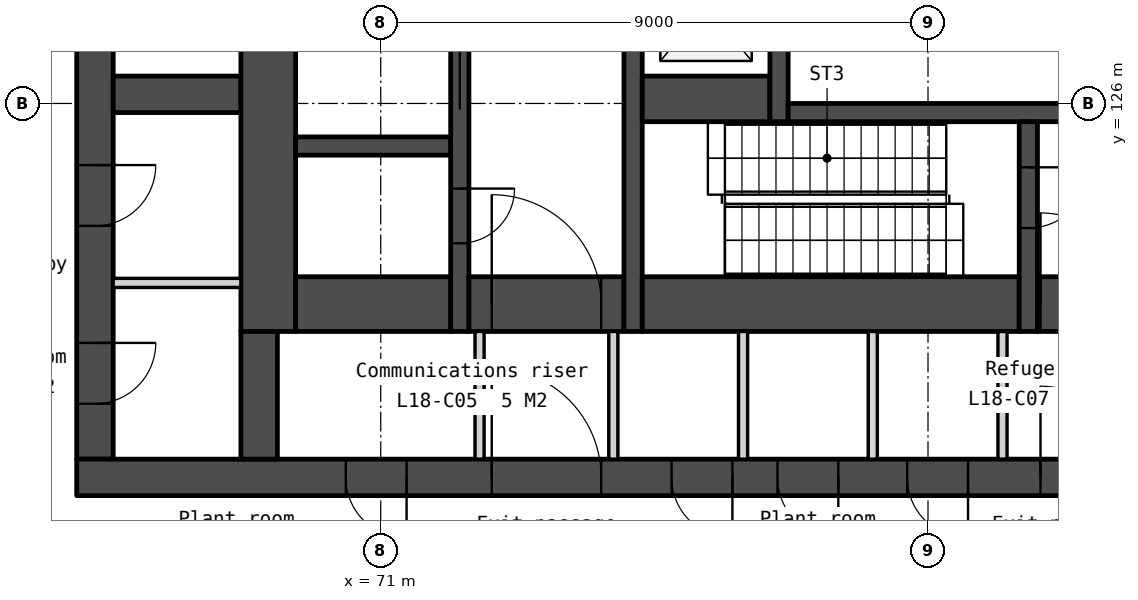
"""IFC4 building model, lengths in metres.
Left out: names, types, materials, properties, quantities, classifications, styles, units other than length and angle.
Written with IfcOpenShell. Run it as: python <this file> out.ifc"""

import sys

from ifc_helpers import new_model, si_unit, direction, frame, frame_2d, origin, place, context, subcontext, project, spatial, rectangle, extrude, element, fill, save


model = new_model("IFC4")
c1 = context("Model", 3, precision=1e-05, world=origin(), true_north=direction((0.0, 1.0)))
c2 = subcontext(c1, "Body", "Model", "MODEL_VIEW")
j1 = project(units=[si_unit("LENGTHUNIT", "METRE"), si_unit("PLANEANGLEUNIT", "RADIAN")], contexts=[c1])
p1 = place(None, origin())
s1 = spatial("IfcSite", under=j1, at=p1, CompositionType="ELEMENT")
p2 = place(p1, origin())
s2 = spatial("IfcBuilding", under=s1, at=p2, CompositionType="ELEMENT")
p3 = place(p2, frame((0.0, 0.0, 77.0)))
s3 = spatial("IfcBuildingStorey", under=s2, at=p3, CompositionType="ELEMENT", Elevation=77.0)
p4 = place(p3, frame((66.3, 133.95, 0.0), z_axis=(0.0, 0.0, 1.0), x_axis=(0.0, -1.0, 0.0)))
e1 = element("IfcWall", 1, at=p4, inside=s3, PredefinedType="SOLIDWALL", context=c2, shape_type="SweptSolid", body=[
    extrude(rectangle(XDim=13.8, YDim=0.6, at=frame_2d((6.9, 0.0))), origin(), (0.0, 0.0, 1.0), 4.35),
])
p5 = place(p4, frame((0.6, 0.0, 0.0)))
e2 = element("IfcOpeningElement", 2, at=p5, cuts=e1, PredefinedType="OPENING", context=c2, shape_type="SweptSolid", body=[
    extrude(rectangle(XDim=1.1, YDim=2.1, at=frame_2d((0.55, 1.05))), frame((0.0, 0.31, 0.0), z_axis=(0.0, -1.0, 0.0), x_axis=(1.0, 0.0, 0.0)), (0.0, 0.0, 1.0), 0.62),
])
p6 = place(p4, frame((11.888, 0.0, 0.0)))
e3 = element("IfcOpeningElement", 3, at=p6, cuts=e1, PredefinedType="OPENING", context=c2, shape_type="SweptSolid", body=[
    extrude(rectangle(XDim=1.0, YDim=2.1, at=frame_2d((0.5, 1.05))), frame((0.0, 0.31, 0.0), z_axis=(0.0, -1.0, 0.0), x_axis=(1.0, 0.0, 0.0)), (0.0, 0.0, 1.0), 0.62),
])
p7 = place(p4, frame((8.963, 0.0, 0.0)))
e4 = element("IfcOpeningElement", 4, at=p7, cuts=e1, PredefinedType="OPENING", context=c2, shape_type="SweptSolid", body=[
    extrude(rectangle(XDim=1.0, YDim=2.1, at=frame_2d((0.5, 1.05))), frame((0.0, 0.31, 0.0), z_axis=(0.0, -1.0, 0.0), x_axis=(1.0, 0.0, 0.0)), (0.0, 0.0, 1.0), 0.62),
])
p8 = place(p3, frame((66.0, 119.85, 0.0), z_axis=(0.0, 0.0, 1.0), x_axis=(1.0, 0.0, 0.0)))
e5 = element("IfcWall", 5, at=p8, inside=s3, PredefinedType="SOLIDWALL", context=c2, shape_type="SweptSolid", body=[
    extrude(rectangle(XDim=28.0, YDim=0.6, at=frame_2d((14.0, 0.0))), origin(), (0.0, 0.0, 1.0), 4.35),
])
p9 = place(p8, frame((6.825, 0.0, 0.0)))
e6 = element("IfcOpeningElement", 6, at=p9, cuts=e5, PredefinedType="OPENING", context=c2, shape_type="SweptSolid", body=[
    extrude(rectangle(XDim=1.8, YDim=2.1, at=frame_2d((0.9, 1.05))), frame((0.0, 0.31, 0.0), z_axis=(0.0, -1.0, 0.0), x_axis=(1.0, 0.0, 0.0)), (0.0, 0.0, 1.0), 0.62),
])
p10 = place(p8, frame((15.85, 0.0, 0.0)))
e7 = element("IfcOpeningElement", 7, at=p10, cuts=e5, PredefinedType="OPENING", context=c2, shape_type="SweptSolid", body=[
    extrude(rectangle(XDim=1.5, YDim=2.1, at=frame_2d((0.75, 1.05))), frame((0.0, 0.31, 0.0), z_axis=(0.0, -1.0, 0.0), x_axis=(1.0, 0.0, 0.0)), (0.0, 0.0, 1.0), 0.62),
])
p11 = place(p8, frame((19.375, 0.0, 0.0)))
e8 = element("IfcOpeningElement", 8, at=p11, cuts=e5, PredefinedType="OPENING", context=c2, shape_type="SweptSolid", body=[
    extrude(rectangle(XDim=1.8, YDim=2.1, at=frame_2d((0.9, 1.05))), frame((0.0, 0.31, 0.0), z_axis=(0.0, -1.0, 0.0), x_axis=(1.0, 0.0, 0.0)), (0.0, 0.0, 1.0), 0.62),
])
p12 = place(p8, frame((4.425, 0.0, 0.0)))
e9 = element("IfcOpeningElement", 9, at=p12, cuts=e5, PredefinedType="OPENING", context=c2, shape_type="SweptSolid", body=[
    extrude(rectangle(XDim=1.0, YDim=2.1, at=frame_2d((0.5, 1.05))), frame((0.0, 0.31, 0.0), z_axis=(0.0, -1.0, 0.0), x_axis=(1.0, 0.0, 0.0)), (0.0, 0.0, 1.0), 0.62),
])
p13 = place(p8, frame((9.783, 0.0, 0.0)))
e10 = element("IfcOpeningElement", 10, at=p13, cuts=e5, PredefinedType="OPENING", context=c2, shape_type="SweptSolid", body=[
    extrude(rectangle(XDim=1.0, YDim=2.1, at=frame_2d((0.5, 1.05))), frame((0.0, 0.31, 0.0), z_axis=(0.0, -1.0, 0.0), x_axis=(1.0, 0.0, 0.0)), (0.0, 0.0, 1.0), 0.62),
])
p14 = place(p8, frame((11.525, 0.0, 0.0)))
e11 = element("IfcOpeningElement", 11, at=p14, cuts=e5, PredefinedType="OPENING", context=c2, shape_type="SweptSolid", body=[
    extrude(rectangle(XDim=1.0, YDim=2.1, at=frame_2d((0.5, 1.05))), frame((0.0, 0.31, 0.0), z_axis=(0.0, -1.0, 0.0), x_axis=(1.0, 0.0, 0.0)), (0.0, 0.0, 1.0), 0.62),
])
p15 = place(p8, frame((13.658, 0.0, 0.0)))
e12 = element("IfcOpeningElement", 12, at=p15, cuts=e5, PredefinedType="OPENING", context=c2, shape_type="SweptSolid", body=[
    extrude(rectangle(XDim=1.0, YDim=2.1, at=frame_2d((0.5, 1.05))), frame((0.0, 0.31, 0.0), z_axis=(0.0, -1.0, 0.0), x_axis=(1.0, 0.0, 0.0)), (0.0, 0.0, 1.0), 0.62),
])
p16 = place(p8, frame((22.575, 0.0, 0.0)))
e13 = element("IfcOpeningElement", 13, at=p16, cuts=e5, PredefinedType="OPENING", context=c2, shape_type="SweptSolid", body=[
    extrude(rectangle(XDim=1.0, YDim=2.1, at=frame_2d((0.5, 1.05))), frame((0.0, 0.31, 0.0), z_axis=(0.0, -1.0, 0.0), x_axis=(1.0, 0.0, 0.0)), (0.0, 0.0, 1.0), 0.62),
])
p17 = place(p3, frame((66.6, 126.15, 0.0), z_axis=(0.0, 0.0, 1.0), x_axis=(1.0, 0.0, 0.0)))
e14 = element("IfcWall", 14, at=p17, inside=s3, PredefinedType="SOLIDWALL", context=c2, shape_type="SweptSolid", body=[
    extrude(rectangle(XDim=2.1, YDim=0.6, at=frame_2d((1.05, 0.0))), origin(), (0.0, 0.0, 1.0), 4.35),
])
p18 = place(p3, frame((66.6, 123.049, 0.0), z_axis=(0.0, 0.0, 1.0), x_axis=(1.0, 0.0, 0.0)))
e15 = element("IfcWall", 15, at=p18, inside=s3, PredefinedType="PARTITIONING", context=c2, shape_type="SweptSolid", body=[
    extrude(rectangle(XDim=2.1, YDim=0.15, at=frame_2d((1.05, 0.0))), origin(), (0.0, 0.0, 1.0), 4.35),
])
p19 = place(p3, frame((69.15, 133.95, 0.0), z_axis=(0.0, 0.0, 1.0), x_axis=(0.0, -1.0, 0.0)))
e16 = element("IfcWall", 16, at=p19, inside=s3, PredefinedType="SOLIDWALL", context=c2, shape_type="SweptSolid", body=[
    extrude(rectangle(XDim=11.7, YDim=0.9, at=frame_2d((5.85, 0.0))), origin(), (0.0, 0.0, 1.0), 4.35),
])
p20 = place(p3, frame((69.0, 122.25, 0.0), z_axis=(0.0, 0.0, 1.0), x_axis=(0.0, -1.0, 0.0)))
e17 = element("IfcWall", 17, at=p20, inside=s3, PredefinedType="SOLIDWALL", context=c2, shape_type="SweptSolid", body=[
    extrude(rectangle(XDim=2.1, YDim=0.6, at=frame_2d((1.05, 0.0))), origin(), (0.0, 0.0, 1.0), 4.35),
])
p21 = place(p3, frame((69.6, 125.3, 0.0), z_axis=(0.0, 0.0, 1.0), x_axis=(1.0, 0.0, 0.0)))
e18 = element("IfcWall", 18, at=p21, inside=s3, PredefinedType="SOLIDWALL", context=c2, shape_type="SweptSolid", body=[
    extrude(rectangle(XDim=2.55, YDim=0.3, at=frame_2d((1.275, 0.0))), origin(), (0.0, 0.0, 1.0), 4.35),
])
p22 = place(p3, frame((69.6, 122.7, 0.0), z_axis=(0.0, 0.0, 1.0), x_axis=(1.0, 0.0, 0.0)))
e19 = element("IfcWall", 19, at=p22, inside=s3, PredefinedType="SOLIDWALL", context=c2, shape_type="SweptSolid", body=[
    extrude(rectangle(XDim=2.55, YDim=0.9, at=frame_2d((1.275, 0.0))), origin(), (0.0, 0.0, 1.0), 4.35),
])
p23 = place(p3, frame((72.3, 133.95, 0.0), z_axis=(0.0, 0.0, 1.0), x_axis=(0.0, -1.0, 0.0)))
e20 = element("IfcWall", 20, at=p23, inside=s3, PredefinedType="SOLIDWALL", context=c2, shape_type="SweptSolid", body=[
    extrude(rectangle(XDim=11.7, YDim=0.3, at=frame_2d((5.85, 0.0))), origin(), (0.0, 0.0, 1.0), 4.35),
])
p24 = place(p23, frame((6.95, 0.0, 0.0)))
e21 = element("IfcOpeningElement", 21, at=p24, cuts=e20, PredefinedType="OPENING", context=c2, shape_type="SweptSolid", body=[
    extrude(rectangle(XDim=1.1, YDim=2.1, at=frame_2d((0.55, 1.05))), frame((0.0, 0.16, 0.0), z_axis=(0.0, -1.0, 0.0), x_axis=(1.0, 0.0, 0.0)), (0.0, 0.0, 1.0), 0.32),
])
p25 = place(p23, frame((9.35, 0.0, 0.0)))
e22 = element("IfcOpeningElement", 22, at=p25, cuts=e20, PredefinedType="OPENING", context=c2, shape_type="SweptSolid", body=[
    extrude(rectangle(XDim=0.9, YDim=2.1, at=frame_2d((0.45, 1.05))), frame((0.0, 0.16, 0.0), z_axis=(0.0, -1.0, 0.0), x_axis=(1.0, 0.0, 0.0)), (0.0, 0.0, 1.0), 0.32),
])
p26 = place(p23, frame((5.1, 0.0, 0.0)))
e23 = element("IfcOpeningElement", 23, at=p26, cuts=e20, PredefinedType="OPENING", context=c2, shape_type="SweptSolid", body=[
    extrude(rectangle(XDim=1.0, YDim=2.1, at=frame_2d((0.5, 1.05))), frame((0.0, 0.16, 0.0), z_axis=(0.0, -1.0, 0.0), x_axis=(1.0, 0.0, 0.0)), (0.0, 0.0, 1.0), 0.32),
])
p27 = place(p3, frame((72.45, 122.7, 0.0), z_axis=(0.0, 0.0, 1.0), x_axis=(1.0, 0.0, 0.0)))
e24 = element("IfcWall", 24, at=p27, inside=s3, PredefinedType="SOLIDWALL", context=c2, shape_type="SweptSolid", body=[
    extrude(rectangle(XDim=2.55, YDim=0.9, at=frame_2d((1.275, 0.0))), origin(), (0.0, 0.0, 1.0), 4.35),
])
p28 = place(p27, frame((0.375, 0.0, 0.0)))
e25 = element("IfcOpeningElement", 25, at=p28, cuts=e24, PredefinedType="OPENING", context=c2, shape_type="SweptSolid", body=[
    extrude(rectangle(XDim=1.8, YDim=2.1, at=frame_2d((0.9, 1.05))), frame((0.0, 0.46, 0.0), z_axis=(0.0, -1.0, 0.0), x_axis=(1.0, 0.0, 0.0)), (0.0, 0.0, 1.0), 0.92),
])
for number, where, z_axis, x_axis in (
    (26, (72.625, 122.25, 0.0), (0.0, 0.0, 1.0), (0.0, -1.0, 0.0)),
    (27, (74.825, 122.25, 0.0), (0.0, 0.0, 1.0), (0.0, -1.0, 0.0)),
):
    element("IfcWall", number, at=place(p3, frame(where, z_axis=z_axis, x_axis=x_axis)), inside=s3, PredefinedType="PARTITIONING", context=c2, shape_type="SweptSolid", body=[
        extrude(rectangle(XDim=2.1, YDim=0.15, at=frame_2d((1.05, 0.0))), origin(), (0.0, 0.0, 1.0), 4.35),
    ])
p29 = place(p3, frame((75.15, 133.95, 0.0), z_axis=(0.0, 0.0, 1.0), x_axis=(0.0, -1.0, 0.0)))
e28 = element("IfcWall", 28, at=p29, inside=s3, PredefinedType="SOLIDWALL", context=c2, shape_type="SweptSolid", body=[
    extrude(rectangle(XDim=11.7, YDim=0.3, at=frame_2d((5.85, 0.0))), origin(), (0.0, 0.0, 1.0), 4.35),
])
p30 = place(p3, frame((75.3, 126.075, 0.0), z_axis=(0.0, 0.0, 1.0), x_axis=(1.0, 0.0, 0.0)))
e29 = element("IfcWall", 29, at=p30, inside=s3, PredefinedType="SOLIDWALL", context=c2, shape_type="SweptSolid", body=[
    extrude(rectangle(XDim=2.1, YDim=0.75, at=frame_2d((1.05, 0.0))), origin(), (0.0, 0.0, 1.0), 4.35),
])
p31 = place(p3, frame((75.3, 122.7, 0.0), z_axis=(0.0, 0.0, 1.0), x_axis=(1.0, 0.0, 0.0)))
e30 = element("IfcWall", 30, at=p31, inside=s3, PredefinedType="SOLIDWALL", context=c2, shape_type="SweptSolid", body=[
    extrude(rectangle(XDim=6.2, YDim=0.9, at=frame_2d((3.1, 0.0))), origin(), (0.0, 0.0, 1.0), 4.35),
])
p32 = place(p3, frame((76.958, 122.25, 0.0), z_axis=(0.0, 0.0, 1.0), x_axis=(0.0, -1.0, 0.0)))
e31 = element("IfcWall", 31, at=p32, inside=s3, PredefinedType="PARTITIONING", context=c2, shape_type="SweptSolid", body=[
    extrude(rectangle(XDim=2.1, YDim=0.15, at=frame_2d((1.05, 0.0))), origin(), (0.0, 0.0, 1.0), 4.35),
])
p33 = place(p3, frame((77.55, 133.95, 0.0), z_axis=(0.0, 0.0, 1.0), x_axis=(0.0, -1.0, 0.0)))
e32 = element("IfcWall", 32, at=p33, inside=s3, PredefinedType="SOLIDWALL", context=c2, shape_type="SweptSolid", body=[
    extrude(rectangle(XDim=8.25, YDim=0.3, at=frame_2d((4.125, 0.0))), origin(), (0.0, 0.0, 1.0), 4.35),
])
p34 = place(p33, frame((0.6, 0.0, 0.0)))
e33 = element("IfcOpeningElement", 33, at=p34, cuts=e32, PredefinedType="OPENING", context=c2, shape_type="SweptSolid", body=[
    extrude(rectangle(XDim=1.1, YDim=2.1, at=frame_2d((0.55, 1.05))), frame((0.0, 0.16, 0.0), z_axis=(0.0, -1.0, 0.0), x_axis=(1.0, 0.0, 0.0)), (0.0, 0.0, 1.0), 0.32),
])
p35 = place(p33, frame((3.2, 0.0, 0.0)))
e34 = element("IfcOpeningElement", 34, at=p35, cuts=e32, PredefinedType="OPENING", context=c2, shape_type="SweptSolid", body=[
    extrude(rectangle(XDim=1.1, YDim=2.1, at=frame_2d((0.55, 1.05))), frame((0.0, 0.16, 0.0), z_axis=(0.0, -1.0, 0.0), x_axis=(1.0, 0.0, 0.0)), (0.0, 0.0, 1.0), 0.32),
])
p36 = place(p33, frame((5.8, 0.0, 0.0)))
e35 = element("IfcOpeningElement", 35, at=p36, cuts=e32, PredefinedType="OPENING", context=c2, shape_type="SweptSolid", body=[
    extrude(rectangle(XDim=1.1, YDim=2.1, at=frame_2d((0.55, 1.05))), frame((0.0, 0.16, 0.0), z_axis=(0.0, -1.0, 0.0), x_axis=(1.0, 0.0, 0.0)), (0.0, 0.0, 1.0), 0.32),
])
p37 = place(p3, frame((77.7, 125.85, 0.0), z_axis=(0.0, 0.0, 1.0), x_axis=(1.0, 0.0, 0.0)))
e36 = element("IfcWall", 36, at=p37, inside=s3, PredefinedType="SOLIDWALL", context=c2, shape_type="SweptSolid", body=[
    extrude(rectangle(XDim=4.6, YDim=0.3, at=frame_2d((2.3, 0.0))), origin(), (0.0, 0.0, 1.0), 4.35),
])
for number, where, z_axis, x_axis in (
    (37, (79.092, 122.25, 0.0), (0.0, 0.0, 1.0), (0.0, -1.0, 0.0)),
    (38, (81.225, 122.25, 0.0), (0.0, 0.0, 1.0), (0.0, -1.0, 0.0)),
):
    element("IfcWall", number, at=place(p3, frame(where, z_axis=z_axis, x_axis=x_axis)), inside=s3, PredefinedType="PARTITIONING", context=c2, shape_type="SweptSolid", body=[
        extrude(rectangle(XDim=2.1, YDim=0.15, at=frame_2d((1.05, 0.0))), origin(), (0.0, 0.0, 1.0), 4.35),
    ])
p38 = place(p3, frame((81.65, 125.7, 0.0), z_axis=(0.0, 0.0, 1.0), x_axis=(0.0, -1.0, 0.0)))
e39 = element("IfcWall", 39, at=p38, inside=s3, PredefinedType="SOLIDWALL", context=c2, shape_type="SweptSolid", body=[
    extrude(rectangle(XDim=3.45, YDim=0.3, at=frame_2d((1.725, 0.0))), origin(), (0.0, 0.0, 1.0), 4.35),
])
p39 = place(p38, frame((0.75, 0.0, 0.0)))
e40 = element("IfcOpeningElement", 40, at=p39, cuts=e39, PredefinedType="OPENING", context=c2, shape_type="SweptSolid", body=[
    extrude(rectangle(XDim=1.0, YDim=2.1, at=frame_2d((0.5, 1.05))), frame((0.0, 0.16, 0.0), z_axis=(0.0, -1.0, 0.0), x_axis=(1.0, 0.0, 0.0)), (0.0, 0.0, 1.0), 0.32),
])
p40 = place(p3, frame((81.8, 122.7, 0.0), z_axis=(0.0, 0.0, 1.0), x_axis=(1.0, 0.0, 0.0)))
e41 = element("IfcWall", 41, at=p40, inside=s3, PredefinedType="SOLIDWALL", context=c2, shape_type="SweptSolid", body=[
    extrude(rectangle(XDim=2.9, YDim=0.9, at=frame_2d((1.45, 0.0))), origin(), (0.0, 0.0, 1.0), 4.35),
])
p41 = place(p40, frame((0.05, 0.0, 0.0)))
e42 = element("IfcOpeningElement", 42, at=p41, cuts=e41, PredefinedType="OPENING", context=c2, shape_type="SweptSolid", body=[
    extrude(rectangle(XDim=1.5, YDim=2.1, at=frame_2d((0.75, 1.05))), frame((0.0, 0.46, 0.0), z_axis=(0.0, -1.0, 0.0), x_axis=(1.0, 0.0, 0.0)), (0.0, 0.0, 1.0), 0.92),
])
p42 = place(p24, origin())
e43 = element("IfcDoor", 43, at=p42, inside=s3, OperationType="SLIDING_TO_LEFT", PredefinedType="DOOR", context=c2, shape_type="SweptSolid", body=[
    extrude(rectangle(XDim=1.1, YDim=2.1, at=frame_2d((0.55, 1.05))), frame((0.0, 0.025, 0.0), z_axis=(0.0, -1.0, 0.0), x_axis=(1.0, 0.0, 0.0)), (0.0, 0.0, 1.0), 0.05),
])
fill(e21, e43)
p43 = place(p28, origin())
e44 = element("IfcDoor", 44, at=p43, inside=s3, OperationType="DOUBLE_DOOR_DOUBLE_SWING", PredefinedType="DOOR", context=c2, shape_type="SweptSolid", body=[
    extrude(rectangle(XDim=1.8, YDim=2.1, at=frame_2d((0.9, 1.05))), frame((0.0, 0.025, 0.0), z_axis=(0.0, -1.0, 0.0), x_axis=(1.0, 0.0, 0.0)), (0.0, 0.0, 1.0), 0.05),
])
fill(e25, e44)
p44 = place(p41, origin())
e45 = element("IfcDoor", 45, at=p44, inside=s3, OperationType="DOUBLE_DOOR_DOUBLE_SWING", PredefinedType="DOOR", context=c2, shape_type="SweptSolid", body=[
    extrude(rectangle(XDim=1.5, YDim=2.1, at=frame_2d((0.75, 1.05))), frame((0.0, 0.025, 0.0), z_axis=(0.0, -1.0, 0.0), x_axis=(1.0, 0.0, 0.0)), (0.0, 0.0, 1.0), 0.05),
])
fill(e42, e45)
p45 = place(p9, origin())
e46 = element("IfcDoor", 46, at=p45, inside=s3, OperationType="DOUBLE_DOOR_DOUBLE_SWING", PredefinedType="DOOR", context=c2, shape_type="SweptSolid", body=[
    extrude(rectangle(XDim=1.8, YDim=2.1, at=frame_2d((0.9, 1.05))), frame((0.0, 0.025, 0.0), z_axis=(0.0, -1.0, 0.0), x_axis=(1.0, 0.0, 0.0)), (0.0, 0.0, 1.0), 0.05),
])
fill(e6, e46)
p46 = place(p10, origin())
e47 = element("IfcDoor", 47, at=p46, inside=s3, OperationType="DOUBLE_DOOR_DOUBLE_SWING", PredefinedType="DOOR", context=c2, shape_type="SweptSolid", body=[
    extrude(rectangle(XDim=1.5, YDim=2.1, at=frame_2d((0.75, 1.05))), frame((0.0, 0.025, 0.0), z_axis=(0.0, -1.0, 0.0), x_axis=(1.0, 0.0, 0.0)), (0.0, 0.0, 1.0), 0.05),
])
fill(e7, e47)
p47 = place(p25, origin())
e48 = element("IfcDoor", 48, at=p47, inside=s3, OperationType="SINGLE_SWING_LEFT", PredefinedType="DOOR", context=c2, shape_type="SweptSolid", body=[
    extrude(rectangle(XDim=0.9, YDim=2.1, at=frame_2d((0.45, 1.05))), frame((0.0, 0.025, 0.0), z_axis=(0.0, -1.0, 0.0), x_axis=(1.0, 0.0, 0.0)), (0.0, 0.0, 1.0), 0.05),
])
fill(e22, e48)
p48 = place(p12, origin())
e49 = element("IfcDoor", 49, at=p48, inside=s3, OperationType="SINGLE_SWING_RIGHT", PredefinedType="DOOR", context=c2, shape_type="SweptSolid", body=[
    extrude(rectangle(XDim=1.0, YDim=2.1, at=frame_2d((0.5, 1.05))), frame((0.0, 0.025, 0.0), z_axis=(0.0, -1.0, 0.0), x_axis=(1.0, 0.0, 0.0)), (0.0, 0.0, 1.0), 0.05),
])
fill(e9, e49)
p49 = place(p13, origin())
e50 = element("IfcDoor", 50, at=p49, inside=s3, OperationType="SINGLE_SWING_RIGHT", PredefinedType="DOOR", context=c2, shape_type="SweptSolid", body=[
    extrude(rectangle(XDim=1.0, YDim=2.1, at=frame_2d((0.5, 1.05))), frame((0.0, 0.025, 0.0), z_axis=(0.0, -1.0, 0.0), x_axis=(1.0, 0.0, 0.0)), (0.0, 0.0, 1.0), 0.05),
])
fill(e10, e50)
p50 = place(p14, origin())
e51 = element("IfcDoor", 51, at=p50, inside=s3, OperationType="SINGLE_SWING_RIGHT", PredefinedType="DOOR", context=c2, shape_type="SweptSolid", body=[
    extrude(rectangle(XDim=1.0, YDim=2.1, at=frame_2d((0.5, 1.05))), frame((0.0, 0.025, 0.0), z_axis=(0.0, -1.0, 0.0), x_axis=(1.0, 0.0, 0.0)), (0.0, 0.0, 1.0), 0.05),
])
fill(e11, e51)
p51 = place(p15, origin())
e52 = element("IfcDoor", 52, at=p51, inside=s3, OperationType="SINGLE_SWING_RIGHT", PredefinedType="DOOR", context=c2, shape_type="SweptSolid", body=[
    extrude(rectangle(XDim=1.0, YDim=2.1, at=frame_2d((0.5, 1.05))), frame((0.0, 0.025, 0.0), z_axis=(0.0, -1.0, 0.0), x_axis=(1.0, 0.0, 0.0)), (0.0, 0.0, 1.0), 0.05),
])
fill(e12, e52)
p52 = place(p39, origin())
e53 = element("IfcDoor", 53, at=p52, inside=s3, OperationType="SINGLE_SWING_LEFT", PredefinedType="DOOR", context=c2, shape_type="SweptSolid", body=[
    extrude(rectangle(XDim=1.0, YDim=2.1, at=frame_2d((0.5, 1.05))), frame((0.0, 0.025, 0.0), z_axis=(0.0, -1.0, 0.0), x_axis=(1.0, 0.0, 0.0)), (0.0, 0.0, 1.0), 0.05),
])
fill(e40, e53)
p53 = place(p6, origin())
e54 = element("IfcDoor", 54, at=p53, inside=s3, OperationType="SINGLE_SWING_LEFT", PredefinedType="DOOR", context=c2, shape_type="SweptSolid", body=[
    extrude(rectangle(XDim=1.0, YDim=2.1, at=frame_2d((0.5, 1.05))), frame((0.0, 0.025, 0.0), z_axis=(0.0, -1.0, 0.0), x_axis=(1.0, 0.0, 0.0)), (0.0, 0.0, 1.0), 0.05),
])
fill(e3, e54)
p54 = place(p7, origin())
e55 = element("IfcDoor", 55, at=p54, inside=s3, OperationType="SINGLE_SWING_LEFT", PredefinedType="DOOR", context=c2, shape_type="SweptSolid", body=[
    extrude(rectangle(XDim=1.0, YDim=2.1, at=frame_2d((0.5, 1.05))), frame((0.0, 0.025, 0.0), z_axis=(0.0, -1.0, 0.0), x_axis=(1.0, 0.0, 0.0)), (0.0, 0.0, 1.0), 0.05),
])
fill(e4, e55)
save(model, sys.argv[1])
